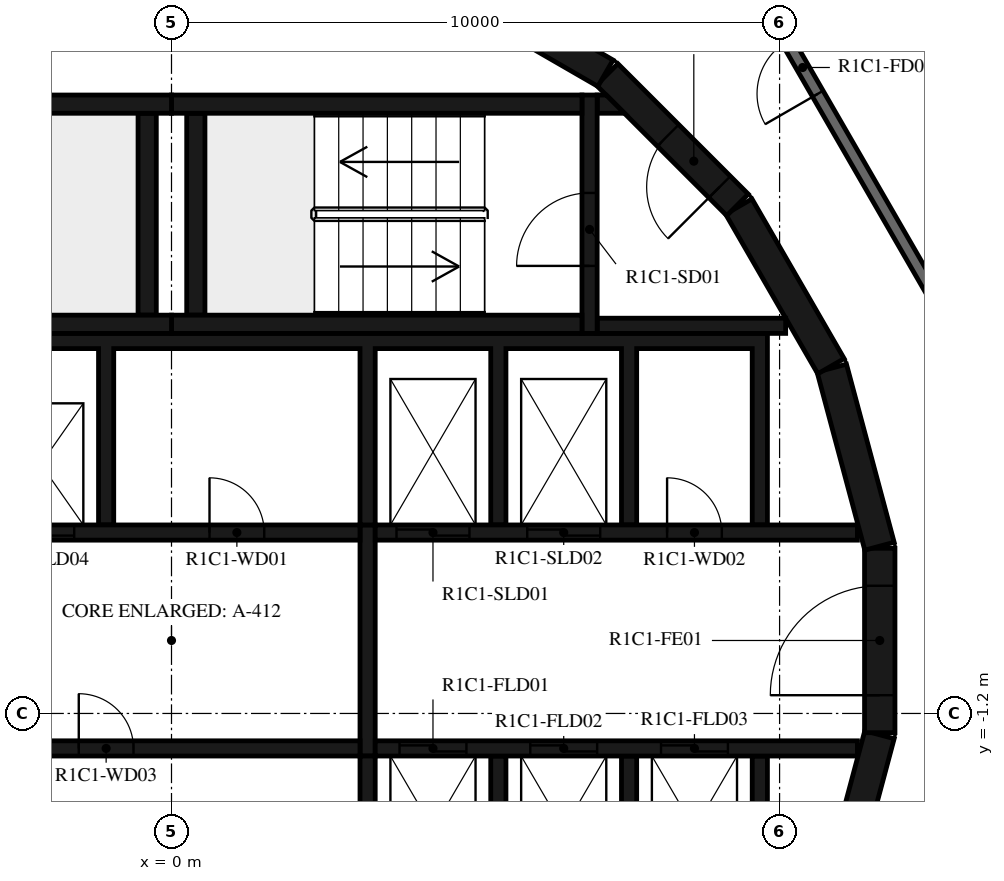
"""IFC4 building model, lengths in metres.
Left out: names, types, materials, properties, quantities, classifications, styles, units other than length and angle.
Written with IfcOpenShell. Run it as: python <this file> out.ifc"""

import sys

from ifc_helpers import new_model, si_unit, direction, frame, frame_2d, origin, place, context, subcontext, project, spatial, polyline, rectangle, outline, extrude, element, fill, save


model = new_model("IFC4")
c1 = context("Model", 3, precision=1e-05, world=origin(), true_north=direction((0.0, 1.0)))
c2 = subcontext(c1, "Body", "Model", "MODEL_VIEW")
j1 = project(units=[si_unit("LENGTHUNIT", "METRE"), si_unit("PLANEANGLEUNIT", "RADIAN")], contexts=[c1])
p1 = place(None, origin())
s1 = spatial("IfcSite", under=j1, at=p1, CompositionType="ELEMENT")
p2 = place(p1, origin())
s2 = spatial("IfcBuilding", under=s1, at=p2, CompositionType="ELEMENT")
p3 = place(p2, frame((0.0, 0.0, 62.9)))
s3 = spatial("IfcBuildingStorey", under=s2, at=p3, CompositionType="ELEMENT", Elevation=62.9)
p4 = place(p3, frame((10.858, -4.479, 0.0), z_axis=(0.0, 0.0, 1.0), x_axis=(0.258734743916, 0.965948410781, 0.0)))
e1 = element("IfcWall", 1, at=p4, inside=s3, PredefinedType="SHEAR", context=c2, shape_type="SweptSolid", body=[
    extrude(rectangle(XDim=3.033, YDim=0.5, at=frame_2d((1.516, 0.0))), origin(), (0.0, 0.0, 1.0), 3.12),
])
p5 = place(p3, frame((11.647, -1.516, 0.0), z_axis=(0.0, 0.0, 1.0), x_axis=(0.0, 1.0, 0.0)))
e2 = element("IfcWall", 2, at=p5, inside=s3, PredefinedType="SHEAR", context=c2, shape_type="SweptSolid", body=[
    extrude(rectangle(XDim=3.033, YDim=0.5, at=frame_2d((1.516, 0.0))), origin(), (0.0, 0.0, 1.0), 3.12),
])
p6 = place(p5, frame((0.616, 0.0, 0.0)))
e3 = element("IfcOpeningElement", 3, at=p6, cuts=e2, PredefinedType="OPENING", context=c2, shape_type="SweptSolid", body=[
    extrude(rectangle(XDim=1.8, YDim=2.1, at=frame_2d((0.9, 1.05))), frame((0.0, 0.26, 0.0), z_axis=(0.0, -1.0, 0.0), x_axis=(1.0, 0.0, 0.0)), (0.0, 0.0, 1.0), 0.52),
])
for number, where, z_axis, x_axis in (
    (4, (11.643, 1.55, 0.0), (0.0, 0.0, 1.0), (-0.259, 0.966, 0.0)),
    (5, (10.845, 4.51, 0.0), (0.0, 0.0, 1.0), (-0.5, 0.866, 0.0)),
):
    element("IfcWall", number, at=place(p3, frame(where, z_axis=z_axis, x_axis=x_axis)), inside=s3, PredefinedType="SHEAR", context=c2, shape_type="SweptSolid", body=[
        extrude(rectangle(XDim=3.033, YDim=0.5, at=frame_2d((1.516, 0.0))), origin(), (0.0, 0.0, 1.0), 3.12),
    ])
p7 = place(p3, frame((9.308, 7.164, 0.0), z_axis=(0.0, 0.0, 1.0), x_axis=(-0.707106781187, 0.707106781187, 0.0)))
e6 = element("IfcWall", 6, at=p7, inside=s3, PredefinedType="SHEAR", context=c2, shape_type="SweptSolid", body=[
    extrude(rectangle(XDim=3.032, YDim=0.5, at=frame_2d((1.516, 0.0))), origin(), (0.0, 0.0, 1.0), 3.12),
])
p8 = place(p7, frame((0.416, 0.0, 0.0)))
e7 = element("IfcOpeningElement", 7, at=p8, cuts=e6, PredefinedType="OPENING", context=c2, shape_type="SweptSolid", body=[
    extrude(rectangle(XDim=1.2, YDim=2.1, at=frame_2d((0.6, 1.05))), frame((0.0, 0.26, 0.0), z_axis=(0.0, -1.0, 0.0), x_axis=(1.0, 0.0, 0.0)), (0.0, 0.0, 1.0), 0.52),
])
p9 = place(p3, frame((7.137, 9.329, 0.0), z_axis=(0.0, 0.0, 1.0), x_axis=(-0.865975092491, 0.500087131594, 0.0)))
e8 = element("IfcWall", 8, at=p9, inside=s3, PredefinedType="SHEAR", context=c2, shape_type="SweptSolid", body=[
    extrude(rectangle(XDim=3.033, YDim=0.5, at=frame_2d((1.516, 0.0))), origin(), (0.0, 0.0, 1.0), 3.12),
])
for number, where, z_axis, x_axis in (
    (9, (0.0, 5.2, 0.0), (0.0, 0.0, 1.0), (1.0, 0.0, 0.0)),
    (10, (0.0, 8.82, 0.0), (0.0, 0.0, 1.0), (1.0, 0.0, 0.0)),
):
    element("IfcWall", number, at=place(p3, frame(where, z_axis=z_axis, x_axis=x_axis)), inside=s3, PredefinedType="SHEAR", context=c2, shape_type="SweptSolid", body=[
        extrude(rectangle(XDim=6.75, YDim=0.3, at=frame_2d((3.375, 0.0))), origin(), (0.0, 0.0, 1.0), 3.12),
    ])
p10 = place(p3, frame((0.4, 5.35, 0.0), z_axis=(0.0, 0.0, 1.0), x_axis=(0.0, 1.0, 0.0)))
e11 = element("IfcWall", 11, at=p10, inside=s3, PredefinedType="SHEAR", context=c2, shape_type="SweptSolid", body=[
    extrude(rectangle(XDim=3.32, YDim=0.3, at=frame_2d((1.66, 0.0))), origin(), (0.0, 0.0, 1.0), 3.12),
])
p11 = place(p3, frame((6.875, 5.05, 0.0), z_axis=(0.0, 0.0, 1.0), x_axis=(0.0, 1.0, 0.0)))
e12 = element("IfcWall", 12, at=p11, inside=s3, PredefinedType="SHEAR", context=c2, shape_type="SweptSolid", body=[
    extrude(rectangle(XDim=3.92, YDim=0.25, at=frame_2d((1.96, 0.0))), origin(), (0.0, 0.0, 1.0), 3.12),
])
p12 = place(p11, frame((1.11, 0.0, 0.0)))
e13 = element("IfcOpeningElement", 13, at=p12, cuts=e12, PredefinedType="OPENING", context=c2, shape_type="SweptSolid", body=[
    extrude(rectangle(XDim=1.2, YDim=2.1, at=frame_2d((0.6, 1.05))), frame((0.0, 0.135, 0.0), z_axis=(0.0, -1.0, 0.0), x_axis=(1.0, 0.0, 0.0)), (0.0, 0.0, 1.0), 0.27),
])
p13 = place(p3, frame((7.0, 5.175, 0.0), z_axis=(0.0, 0.0, 1.0), x_axis=(1.0, 0.0, 0.0)))
e14 = element("IfcWall", 14, at=p13, inside=s3, PredefinedType="SHEAR", context=c2, shape_type="SweptSolid", body=[
    extrude(rectangle(XDim=3.1, YDim=0.25, at=frame_2d((1.55, 0.0))), origin(), (0.0, 0.0, 1.0), 3.12),
])
p14 = place(p3, origin())
e15 = element("IfcWall", 15, at=p14, inside=s3, PredefinedType="SHEAR", context=c2, shape_type="SweptSolid", body=[
    extrude(outline(polyline([(7.448, 8.67), (7.0, 8.67), (7.0, 8.97), (7.148, 8.97), (7.448, 8.67)])), origin(), (0.0, 0.0, 1.0), 3.12),
])
for number, where, z_axis, x_axis in (
    (16, (-6.75, 5.2, 0.0), (0.0, 0.0, 1.0), (1.0, 0.0, 0.0)),
    (17, (-6.75, 8.82, 0.0), (0.0, 0.0, 1.0), (1.0, 0.0, 0.0)),
):
    element("IfcWall", number, at=place(p3, frame(where, z_axis=z_axis, x_axis=x_axis)), inside=s3, PredefinedType="SHEAR", context=c2, shape_type="SweptSolid", body=[
        extrude(rectangle(XDim=6.75, YDim=0.3, at=frame_2d((3.375, 0.0))), origin(), (0.0, 0.0, 1.0), 3.12),
    ])
p15 = place(p3, frame((-0.4, 5.35, 0.0), z_axis=(0.0, 0.0, 1.0), x_axis=(0.0, 1.0, 0.0)))
e18 = element("IfcWall", 18, at=p15, inside=s3, PredefinedType="SHEAR", context=c2, shape_type="SweptSolid", body=[
    extrude(rectangle(XDim=3.32, YDim=0.3, at=frame_2d((1.66, 0.0))), origin(), (0.0, 0.0, 1.0), 3.12),
])
p16 = place(p3, origin())
e19 = element("IfcWall", 19, at=p16, inside=s3, PredefinedType="SHEAR", context=c2, shape_type="SweptSolid", body=[
    extrude(outline(polyline([(-9.55, 4.8), (-7.65, 4.8), (-7.65, 1.9), (-7.4, 1.9), (-7.4, 4.8), (-5.5, 4.8), (-5.5, 1.9), (-5.25, 1.9), (-5.25, 4.8), (-3.35, 4.8), (-3.35, 1.9), (-3.1, 1.9), (-3.1, 4.8), (-1.2, 4.8), (-1.2, 1.9), (-0.95, 1.9), (-0.95, 4.8), (3.1, 4.8), (3.1, 1.9), (3.35, 1.9), (3.35, 4.8), (5.25, 4.8), (5.25, 1.9), (5.5, 1.9), (5.5, 4.8), (7.4, 4.8), (7.4, 1.9), (7.65, 1.9), (7.65, 4.8), (9.55, 4.8), (9.55, 1.9), (9.8, 1.9), (9.8, 4.8), (9.8, 5.05), (-9.8, 5.05), (-9.8, 4.8), (-9.8, 1.9), (-9.55, 1.9), (-9.55, 4.8)])), origin(), (0.0, 0.0, 1.0), 3.12),
])
p17 = place(p3, origin())
e20 = element("IfcWall", 20, at=p17, inside=s3, PredefinedType="SHEAR", context=c2, shape_type="SweptSolid", body=[
    extrude(outline(polyline([(9.8, -5.05), (9.8, -4.8), (9.8, -1.9), (9.55, -1.9), (9.55, -4.8), (7.65, -4.8), (7.65, -1.9), (7.4, -1.9), (7.4, -4.8), (5.5, -4.8), (5.5, -1.9), (5.25, -1.9), (5.25, -4.8), (3.35, -4.8), (3.35, -1.9), (3.1, -1.9), (3.1, -4.8), (-5.25, -4.8), (-5.25, -1.9), (-5.5, -1.9), (-5.5, -4.8), (-7.4, -4.8), (-7.4, -1.9), (-7.65, -1.9), (-7.65, -4.8), (-9.55, -4.8), (-9.55, -1.9), (-9.8, -1.9), (-9.8, -4.8), (-9.8, -5.05), (9.8, -5.05)])), origin(), (0.0, 0.0, 1.0), 3.12),
])
p18 = place(p3, frame((-11.28, 1.775, 0.0), z_axis=(0.0, 0.0, 1.0), x_axis=(1.0, 0.0, 0.0)))
e21 = element("IfcWall", 21, at=p18, inside=s3, PredefinedType="SHEAR", context=c2, shape_type="SweptSolid", body=[
    extrude(rectangle(XDim=14.38, YDim=0.25, at=frame_2d((7.19, 0.0))), origin(), (0.0, 0.0, 1.0), 3.12),
])
p19 = place(p18, frame((2.13, 0.0, 0.0)))
e22 = element("IfcOpeningElement", 22, at=p19, cuts=e21, PredefinedType="OPENING", context=c2, shape_type="SweptSolid", body=[
    extrude(rectangle(XDim=1.1, YDim=2.1, at=frame_2d((0.55, 1.05))), frame((0.0, 0.135, 0.0), z_axis=(0.0, -1.0, 0.0), x_axis=(1.0, 0.0, 0.0)), (0.0, 0.0, 1.0), 0.27),
])
p20 = place(p18, frame((4.28, 0.0, 0.0)))
e23 = element("IfcOpeningElement", 23, at=p20, cuts=e21, PredefinedType="OPENING", context=c2, shape_type="SweptSolid", body=[
    extrude(rectangle(XDim=1.1, YDim=2.1, at=frame_2d((0.55, 1.05))), frame((0.0, 0.135, 0.0), z_axis=(0.0, -1.0, 0.0), x_axis=(1.0, 0.0, 0.0)), (0.0, 0.0, 1.0), 0.27),
])
p21 = place(p18, frame((6.43, 0.0, 0.0)))
e24 = element("IfcOpeningElement", 24, at=p21, cuts=e21, PredefinedType="OPENING", context=c2, shape_type="SweptSolid", body=[
    extrude(rectangle(XDim=1.1, YDim=2.1, at=frame_2d((0.55, 1.05))), frame((0.0, 0.135, 0.0), z_axis=(0.0, -1.0, 0.0), x_axis=(1.0, 0.0, 0.0)), (0.0, 0.0, 1.0), 0.27),
])
p22 = place(p18, frame((8.58, 0.0, 0.0)))
e25 = element("IfcOpeningElement", 25, at=p22, cuts=e21, PredefinedType="OPENING", context=c2, shape_type="SweptSolid", body=[
    extrude(rectangle(XDim=1.1, YDim=2.1, at=frame_2d((0.55, 1.05))), frame((0.0, 0.135, 0.0), z_axis=(0.0, -1.0, 0.0), x_axis=(1.0, 0.0, 0.0)), (0.0, 0.0, 1.0), 0.27),
])
p23 = place(p18, frame((11.905, 0.0, 0.0)))
e26 = element("IfcOpeningElement", 26, at=p23, cuts=e21, PredefinedType="OPENING", context=c2, shape_type="SweptSolid", body=[
    extrude(rectangle(XDim=0.9, YDim=2.1, at=frame_2d((0.45, 1.05))), frame((0.0, 0.135, 0.0), z_axis=(0.0, -1.0, 0.0), x_axis=(1.0, 0.0, 0.0)), (0.0, 0.0, 1.0), 0.27),
])
p24 = place(p3, frame((3.35, 1.775, 0.0), z_axis=(0.0, 0.0, 1.0), x_axis=(1.0, 0.0, 0.0)))
e27 = element("IfcWall", 27, at=p24, inside=s3, PredefinedType="SHEAR", context=c2, shape_type="SweptSolid", body=[
    extrude(rectangle(XDim=7.93, YDim=0.25, at=frame_2d((3.965, 0.0))), origin(), (0.0, 0.0, 1.0), 3.12),
])
p25 = place(p24, frame((0.35, 0.0, 0.0)))
e28 = element("IfcOpeningElement", 28, at=p25, cuts=e27, PredefinedType="OPENING", context=c2, shape_type="SweptSolid", body=[
    extrude(rectangle(XDim=1.2, YDim=2.4, at=frame_2d((0.6, 1.2))), frame((0.0, 0.135, 0.0), z_axis=(0.0, -1.0, 0.0), x_axis=(1.0, 0.0, 0.0)), (0.0, 0.0, 1.0), 0.27),
])
p26 = place(p24, frame((2.5, 0.0, 0.0)))
e29 = element("IfcOpeningElement", 29, at=p26, cuts=e27, PredefinedType="OPENING", context=c2, shape_type="SweptSolid", body=[
    extrude(rectangle(XDim=1.2, YDim=2.4, at=frame_2d((0.6, 1.2))), frame((0.0, 0.135, 0.0), z_axis=(0.0, -1.0, 0.0), x_axis=(1.0, 0.0, 0.0)), (0.0, 0.0, 1.0), 0.27),
])
p27 = place(p24, frame((4.8, 0.0, 0.0)))
e30 = element("IfcOpeningElement", 30, at=p27, cuts=e27, PredefinedType="OPENING", context=c2, shape_type="SweptSolid", body=[
    extrude(rectangle(XDim=0.9, YDim=2.1, at=frame_2d((0.45, 1.05))), frame((0.0, 0.135, 0.0), z_axis=(0.0, -1.0, 0.0), x_axis=(1.0, 0.0, 0.0)), (0.0, 0.0, 1.0), 0.27),
])
p28 = place(p3, frame((-11.28, -1.775, 0.0), z_axis=(0.0, 0.0, 1.0), x_axis=(1.0, 0.0, 0.0)))
e31 = element("IfcWall", 31, at=p28, inside=s3, PredefinedType="SHEAR", context=c2, shape_type="SweptSolid", body=[
    extrude(rectangle(XDim=14.38, YDim=0.25, at=frame_2d((7.19, 0.0))), origin(), (0.0, 0.0, 1.0), 3.12),
])
p29 = place(p28, frame((9.755, 0.0, 0.0)))
e32 = element("IfcOpeningElement", 32, at=p29, cuts=e31, PredefinedType="OPENING", context=c2, shape_type="SweptSolid", body=[
    extrude(rectangle(XDim=0.9, YDim=2.1, at=frame_2d((0.45, 1.05))), frame((0.0, 0.135, 0.0), z_axis=(0.0, -1.0, 0.0), x_axis=(1.0, 0.0, 0.0)), (0.0, 0.0, 1.0), 0.27),
])
p30 = place(p3, frame((3.35, -1.775, 0.0), z_axis=(0.0, 0.0, 1.0), x_axis=(1.0, 0.0, 0.0)))
e33 = element("IfcWall", 33, at=p30, inside=s3, PredefinedType="SHEAR", context=c2, shape_type="SweptSolid", body=[
    extrude(rectangle(XDim=7.93, YDim=0.25, at=frame_2d((3.965, 0.0))), origin(), (0.0, 0.0, 1.0), 3.12),
])
p31 = place(p30, frame((0.4, 0.0, 0.0)))
e34 = element("IfcOpeningElement", 34, at=p31, cuts=e33, PredefinedType="OPENING", context=c2, shape_type="SweptSolid", body=[
    extrude(rectangle(XDim=1.1, YDim=2.4, at=frame_2d((0.55, 1.2))), frame((0.0, 0.135, 0.0), z_axis=(0.0, -1.0, 0.0), x_axis=(1.0, 0.0, 0.0)), (0.0, 0.0, 1.0), 0.27),
])
p32 = place(p30, frame((2.55, 0.0, 0.0)))
e35 = element("IfcOpeningElement", 35, at=p32, cuts=e33, PredefinedType="OPENING", context=c2, shape_type="SweptSolid", body=[
    extrude(rectangle(XDim=1.1, YDim=2.4, at=frame_2d((0.55, 1.2))), frame((0.0, 0.135, 0.0), z_axis=(0.0, -1.0, 0.0), x_axis=(1.0, 0.0, 0.0)), (0.0, 0.0, 1.0), 0.27),
])
p33 = place(p30, frame((4.7, 0.0, 0.0)))
e36 = element("IfcOpeningElement", 36, at=p33, cuts=e33, PredefinedType="OPENING", context=c2, shape_type="SweptSolid", body=[
    extrude(rectangle(XDim=1.1, YDim=2.4, at=frame_2d((0.55, 1.2))), frame((0.0, 0.135, 0.0), z_axis=(0.0, -1.0, 0.0), x_axis=(1.0, 0.0, 0.0)), (0.0, 0.0, 1.0), 0.27),
])
p34 = place(p3, frame((3.225, -1.9, 0.0), z_axis=(0.0, 0.0, 1.0), x_axis=(0.0, 1.0, 0.0)))
e37 = element("IfcWall", 37, at=p34, inside=s3, PredefinedType="SHEAR", context=c2, shape_type="SweptSolid", body=[
    extrude(rectangle(XDim=3.8, YDim=0.25, at=frame_2d((1.9, 0.0))), origin(), (0.0, 0.0, 1.0), 3.12),
])
p35 = place(p3, frame((13.7, 3.671, 0.0), z_axis=(0.0, 0.0, 1.0), x_axis=(-0.500001669485, 0.866024439905, 0.0)))
e38 = element("IfcWall", 38, at=p35, inside=s3, PredefinedType="STANDARD", context=c2, shape_type="SweptSolid", body=[
    extrude(rectangle(XDim=7.342, YDim=0.2, at=frame_2d((3.671, 0.0))), origin(), (0.0, 0.0, 1.0), 3.12),
])
p36 = place(p35, frame((6.142, 0.0, 0.0)))
e39 = element("IfcOpeningElement", 39, at=p36, cuts=e38, PredefinedType="OPENING", context=c2, shape_type="SweptSolid", body=[
    extrude(rectangle(XDim=1.0, YDim=2.1, at=frame_2d((0.5, 1.05))), frame((0.0, 0.11, 0.0), z_axis=(0.0, -1.0, 0.0), x_axis=(1.0, 0.0, 0.0)), (0.0, 0.0, 1.0), 0.22),
])
p37 = place(p12, origin())
e40 = element("IfcDoor", 40, at=p37, inside=s3, OperationType="SINGLE_SWING_LEFT", PredefinedType="DOOR", context=c2, shape_type="SweptSolid", body=[
    extrude(rectangle(XDim=1.2, YDim=2.1, at=frame_2d((0.6, 1.05))), frame((0.0, 0.025, 0.0), z_axis=(0.0, -1.0, 0.0), x_axis=(1.0, 0.0, 0.0)), (0.0, 0.0, 1.0), 0.05),
])
fill(e13, e40)
p38 = place(p8, origin())
e41 = element("IfcDoor", 41, at=p38, inside=s3, OperationType="SINGLE_SWING_RIGHT", PredefinedType="DOOR", context=c2, shape_type="SweptSolid", body=[
    extrude(rectangle(XDim=1.2, YDim=2.1, at=frame_2d((0.6, 1.05))), frame((0.0, 0.025, 0.0), z_axis=(0.0, -1.0, 0.0), x_axis=(1.0, 0.0, 0.0)), (0.0, 0.0, 1.0), 0.05),
])
fill(e7, e41)
p39 = place(p6, origin())
e42 = element("IfcDoor", 42, at=p39, inside=s3, OperationType="DOUBLE_DOOR_SINGLE_SWING", PredefinedType="DOOR", context=c2, shape_type="SweptSolid", body=[
    extrude(rectangle(XDim=1.8, YDim=2.1, at=frame_2d((0.9, 1.05))), frame((0.0, 0.025, 0.0), z_axis=(0.0, -1.0, 0.0), x_axis=(1.0, 0.0, 0.0)), (0.0, 0.0, 1.0), 0.05),
])
fill(e3, e42)
p40 = place(p22, origin())
e43 = element("IfcDoor", 43, at=p40, inside=s3, OperationType="DOUBLE_DOOR_SLIDING", PredefinedType="DOOR", context=c2, shape_type="SweptSolid", body=[
    extrude(rectangle(XDim=1.1, YDim=2.1, at=frame_2d((0.55, 1.05))), frame((0.0, 0.025, 0.0), z_axis=(0.0, -1.0, 0.0), x_axis=(1.0, 0.0, 0.0)), (0.0, 0.0, 1.0), 0.05),
])
fill(e25, e43)
p41 = place(p25, origin())
e44 = element("IfcDoor", 44, at=p41, inside=s3, OperationType="DOUBLE_DOOR_SLIDING", PredefinedType="DOOR", context=c2, shape_type="SweptSolid", body=[
    extrude(rectangle(XDim=1.2, YDim=2.4, at=frame_2d((0.6, 1.2))), frame((0.0, 0.025, 0.0), z_axis=(0.0, -1.0, 0.0), x_axis=(1.0, 0.0, 0.0)), (0.0, 0.0, 1.0), 0.05),
])
fill(e28, e44)
p42 = place(p26, origin())
e45 = element("IfcDoor", 45, at=p42, inside=s3, OperationType="DOUBLE_DOOR_SLIDING", PredefinedType="DOOR", context=c2, shape_type="SweptSolid", body=[
    extrude(rectangle(XDim=1.2, YDim=2.4, at=frame_2d((0.6, 1.2))), frame((0.0, 0.025, 0.0), z_axis=(0.0, -1.0, 0.0), x_axis=(1.0, 0.0, 0.0)), (0.0, 0.0, 1.0), 0.05),
])
fill(e29, e45)
p43 = place(p31, origin())
e46 = element("IfcDoor", 46, at=p43, inside=s3, OperationType="DOUBLE_DOOR_SLIDING", PredefinedType="DOOR", context=c2, shape_type="SweptSolid", body=[
    extrude(rectangle(XDim=1.1, YDim=2.4, at=frame_2d((0.55, 1.2))), frame((0.0, 0.025, 0.0), z_axis=(0.0, -1.0, 0.0), x_axis=(1.0, 0.0, 0.0)), (0.0, 0.0, 1.0), 0.05),
])
fill(e34, e46)
p44 = place(p32, origin())
e47 = element("IfcDoor", 47, at=p44, inside=s3, OperationType="DOUBLE_DOOR_SLIDING", PredefinedType="DOOR", context=c2, shape_type="SweptSolid", body=[
    extrude(rectangle(XDim=1.1, YDim=2.4, at=frame_2d((0.55, 1.2))), frame((0.0, 0.025, 0.0), z_axis=(0.0, -1.0, 0.0), x_axis=(1.0, 0.0, 0.0)), (0.0, 0.0, 1.0), 0.05),
])
fill(e35, e47)
p45 = place(p33, origin())
e48 = element("IfcDoor", 48, at=p45, inside=s3, OperationType="DOUBLE_DOOR_SLIDING", PredefinedType="DOOR", context=c2, shape_type="SweptSolid", body=[
    extrude(rectangle(XDim=1.1, YDim=2.4, at=frame_2d((0.55, 1.2))), frame((0.0, 0.025, 0.0), z_axis=(0.0, -1.0, 0.0), x_axis=(1.0, 0.0, 0.0)), (0.0, 0.0, 1.0), 0.05),
])
fill(e36, e48)
p46 = place(p23, origin())
e49 = element("IfcDoor", 49, at=p46, inside=s3, OperationType="SINGLE_SWING_RIGHT", PredefinedType="DOOR", context=c2, shape_type="SweptSolid", body=[
    extrude(rectangle(XDim=0.9, YDim=2.1, at=frame_2d((0.45, 1.05))), frame((0.0, 0.025, 0.0), z_axis=(0.0, -1.0, 0.0), x_axis=(1.0, 0.0, 0.0)), (0.0, 0.0, 1.0), 0.05),
])
fill(e26, e49)
p47 = place(p27, origin())
e50 = element("IfcDoor", 50, at=p47, inside=s3, OperationType="SINGLE_SWING_LEFT", PredefinedType="DOOR", context=c2, shape_type="SweptSolid", body=[
    extrude(rectangle(XDim=0.9, YDim=2.1, at=frame_2d((0.45, 1.05))), frame((0.0, 0.025, 0.0), z_axis=(0.0, -1.0, 0.0), x_axis=(1.0, 0.0, 0.0)), (0.0, 0.0, 1.0), 0.05),
])
fill(e30, e50)
p48 = place(p29, origin())
e51 = element("IfcDoor", 51, at=p48, inside=s3, OperationType="SINGLE_SWING_RIGHT", PredefinedType="DOOR", context=c2, shape_type="SweptSolid", body=[
    extrude(rectangle(XDim=0.9, YDim=2.1, at=frame_2d((0.45, 1.05))), frame((0.0, 0.025, 0.0), z_axis=(0.0, -1.0, 0.0), x_axis=(1.0, 0.0, 0.0)), (0.0, 0.0, 1.0), 0.05),
])
fill(e32, e51)
p49 = place(p36, origin())
e52 = element("IfcDoor", 52, at=p49, inside=s3, OperationType="SINGLE_SWING_RIGHT", PredefinedType="DOOR", context=c2, shape_type="SweptSolid", body=[
    extrude(rectangle(XDim=1.0, YDim=2.1, at=frame_2d((0.5, 1.05))), frame((0.0, 0.025, 0.0), z_axis=(0.0, -1.0, 0.0), x_axis=(1.0, 0.0, 0.0)), (0.0, 0.0, 1.0), 0.05),
])
fill(e39, e52)
save(model, sys.argv[1])
